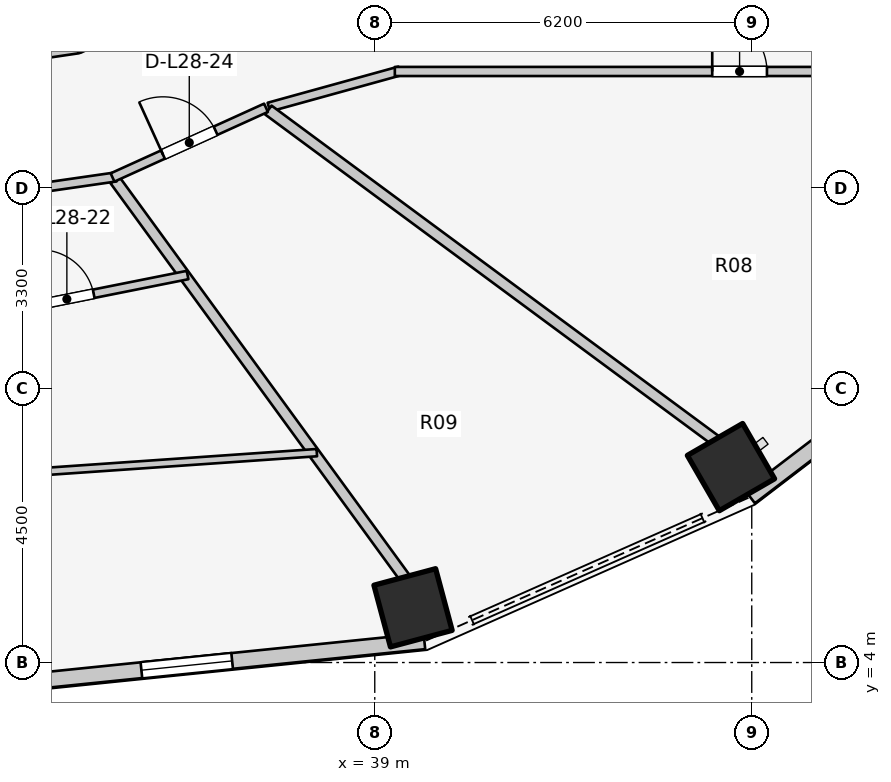
"""IFC4 building model, lengths in metres.
Left out: names, types, materials, properties, quantities, classifications, styles, units other than length and angle.
Written with IfcOpenShell. Run it as: python <this file> out.ifc"""

import sys

from ifc_helpers import new_model, si_unit, direction, frame, frame_2d, origin, origin_2d, place, context, subcontext, project, spatial, rectangle, extrude, element, fill, save


model = new_model("IFC4")
c1 = context("Model", 3, precision=1e-05, world=origin(), true_north=direction((0.0, 1.0)))
c2 = subcontext(c1, "Body", "Model", "MODEL_VIEW")
j1 = project(units=[si_unit("LENGTHUNIT", "METRE"), si_unit("PLANEANGLEUNIT", "RADIAN")], contexts=[c1])
p1 = place(None, origin())
s1 = spatial("IfcSite", under=j1, at=p1, CompositionType="ELEMENT")
p2 = place(p1, origin())
s2 = spatial("IfcBuilding", under=s1, at=p2, CompositionType="ELEMENT")
p3 = place(p2, frame((0.0, 0.0, 94.9)))
s3 = spatial("IfcBuildingStorey", under=s2, at=p3, CompositionType="ELEMENT", Elevation=94.9)
for number, where, z_axis, x_axis in (
    (1, (39.629, 4.9, 0.0), (0.0, 0.0, 1.0), (0.259, -0.966, 0.0)),
    (2, (44.858, 7.214, 0.0), (0.0, 0.0, 1.0), (0.5, -0.866, 0.0)),
):
    element("IfcColumn", number, at=place(p3, frame(where, z_axis=z_axis, x_axis=x_axis)), inside=s3, PredefinedType="COLUMN", context=c2, shape_type="SweptSolid", body=[
        extrude(rectangle(XDim=1.05, YDim=1.05, at=origin_2d()), origin(), (0.0, 0.0, 1.0), 3.1),
    ])
p4 = place(p3, frame((32.0, 3.551, 0.0), z_axis=(0.0, 0.0, 1.0), x_axis=(0.994821390558, 0.101638579726, 0.0)))
e3 = element("IfcWall", 3, at=p4, inside=s3, PredefinedType="STANDARD", context=c2, shape_type="SweptSolid", body=[
    extrude(rectangle(XDim=7.857, YDim=0.26, at=frame_2d((3.929, 0.0))), origin(), (0.0, 0.0, 1.0), 2.85),
])
p5 = place(p4, frame((3.178, 0.0, 0.75)))
e4 = element("IfcOpeningElement", 4, at=p5, cuts=e3, PredefinedType="OPENING", context=c2, shape_type="SweptSolid", body=[
    extrude(rectangle(XDim=1.5, YDim=1.6, at=frame_2d((0.75, 0.8))), frame((0.0, 0.14, 0.0), z_axis=(0.0, -1.0, 0.0), x_axis=(1.0, 0.0, 0.0)), (0.0, 0.0, 1.0), 0.28),
])
p6 = place(p3, frame((45.173, 6.722, 0.0), z_axis=(0.0, 0.0, 1.0), x_axis=(0.794809810864, 0.606858603427, 0.0)))
e5 = element("IfcWall", 5, at=p6, inside=s3, PredefinedType="STANDARD", context=c2, shape_type="SweptSolid", body=[
    extrude(rectangle(XDim=5.149, YDim=0.26, at=frame_2d((2.575, 0.0))), origin(), (0.0, 0.0, 1.0), 2.85),
])
p7 = place(p3, frame((32.0, 13.78, 0.0), z_axis=(0.0, 0.0, 1.0), x_axis=(0.989268584896, 0.146108408166, 0.0)))
e6 = element("IfcWall", 6, at=p7, inside=s3, PredefinedType="PARTITIONING", context=c2, shape_type="SweptSolid", body=[
    extrude(rectangle(XDim=2.151, YDim=0.15, at=frame_2d((1.075, 0.0))), origin(), (0.0, 0.0, 1.0), 2.272),
])
p8 = place(p3, frame((34.127, 14.094, 0.0), z_axis=(0.0, 0.0, 1.0), x_axis=(0.906943449489, 0.421252393975, 0.0)))
e7 = element("IfcWall", 7, at=p8, inside=s3, PredefinedType="PARTITIONING", context=c2, shape_type="SweptSolid", body=[
    extrude(rectangle(XDim=2.186, YDim=0.15, at=frame_2d((1.093, 0.0))), origin(), (0.0, 0.0, 1.0), 2.272),
])
p9 = place(p3, frame((37.258, 13.133, 0.0), z_axis=(0.0, 0.0, 1.0), x_axis=(0.963833843713, 0.266503886865, 0.0)))
e8 = element("IfcWall", 8, at=p9, inside=s3, PredefinedType="PARTITIONING", context=c2, shape_type="SweptSolid", body=[
    extrude(rectangle(XDim=2.232, YDim=0.15, at=frame_2d((1.116, 0.0))), origin(), (0.0, 0.0, 1.0), 2.272),
])
p10 = place(p3, frame((39.33, 13.72, 0.0), z_axis=(0.0, 0.0, 1.0), x_axis=(1.0, 0.0, 0.0)))
e9 = element("IfcWall", 9, at=p10, inside=s3, PredefinedType="PARTITIONING", context=c2, shape_type="SweptSolid", body=[
    extrude(rectangle(XDim=7.52, YDim=0.15, at=frame_2d((3.76, 0.0))), origin(), (0.0, 0.0, 1.0), 2.272),
])
p11 = place(p10, frame((5.22, 0.0, 0.0)))
e10 = element("IfcOpeningElement", 10, at=p11, cuts=e9, PredefinedType="OPENING", context=c2, shape_type="SweptSolid", body=[
    extrude(rectangle(XDim=0.9, YDim=2.1, at=frame_2d((0.45, 1.05))), frame((0.0, 0.085, 0.0), z_axis=(0.0, -1.0, 0.0), x_axis=(1.0, 0.0, 0.0)), (0.0, 0.0, 1.0), 0.17),
])
p12 = place(p3, frame((34.727, 11.934, 0.0), z_axis=(0.0, 0.0, 1.0), x_axis=(0.589042211476, -0.808102266486, 0.0)))
e11 = element("IfcWall", 11, at=p12, inside=s3, PredefinedType="PARTITIONING", context=c2, shape_type="SweptSolid", body=[
    extrude(rectangle(XDim=8.101, YDim=0.18, at=frame_2d((4.051, 0.0))), origin(), (0.0, 0.0, 1.0), 2.272),
])
p13 = place(p3, frame((37.249, 13.086, 0.0), z_axis=(0.0, 0.0, 1.0), x_axis=(0.80430981394, -0.594210167533, 0.0)))
e12 = element("IfcWall", 12, at=p13, inside=s3, PredefinedType="PARTITIONING", context=c2, shape_type="SweptSolid", body=[
    extrude(rectangle(XDim=9.146, YDim=0.18, at=frame_2d((4.573, 0.0))), origin(), (0.0, 0.0, 1.0), 2.272),
])
p14 = place(p3, frame((31.99, 7.032, 0.0), z_axis=(0.0, 0.0, 1.0), x_axis=(0.997605327057, 0.06916365684, 0.0)))
e13 = element("IfcWall", 13, at=p14, inside=s3, PredefinedType="MOVABLE", context=c2, shape_type="SweptSolid", body=[
    extrude(rectangle(XDim=6.072, YDim=0.12, at=frame_2d((3.036, 0.0))), origin(), (0.0, 0.0, 1.0), 2.272),
])
p15 = place(p3, frame((31.95, 11.583, 0.0), z_axis=(0.0, 0.0, 1.0), x_axis=(0.989761784218, 0.142729150844, 0.0)))
e14 = element("IfcWall", 14, at=p15, inside=s3, PredefinedType="PARTITIONING", context=c2, shape_type="SweptSolid", body=[
    extrude(rectangle(XDim=2.822, YDim=0.15, at=frame_2d((1.411, 0.0))), origin(), (0.0, 0.0, 1.0), 2.272),
])
p16 = place(p3, frame((31.951, 9.58, 0.0), z_axis=(0.0, 0.0, 1.0), x_axis=(0.980668708329, 0.195675457082, 0.0)))
e15 = element("IfcWall", 15, at=p16, inside=s3, PredefinedType="PLUMBINGWALL", context=c2, shape_type="SweptSolid", body=[
    extrude(rectangle(XDim=4.049, YDim=0.14, at=frame_2d((2.024, 0.0))), origin(), (0.0, 0.0, 1.0), 2.272),
])
p17 = place(p16, frame((1.574, 0.0, 0.0)))
e16 = element("IfcOpeningElement", 16, at=p17, cuts=e15, PredefinedType="OPENING", context=c2, shape_type="SweptSolid", body=[
    extrude(rectangle(XDim=0.9, YDim=2.1, at=frame_2d((0.45, 1.05))), frame((0.0, 0.08, 0.0), z_axis=(0.0, -1.0, 0.0), x_axis=(1.0, 0.0, 0.0)), (0.0, 0.0, 1.0), 0.16),
])
p18 = place(p3, frame((34.687, 11.977, 0.0), z_axis=(0.0, 0.0, 1.0), x_axis=(0.910568469686, 0.41335827319, 0.0)))
e17 = element("IfcWall", 17, at=p18, inside=s3, PredefinedType="PARTITIONING", context=c2, shape_type="SweptSolid", body=[
    extrude(rectangle(XDim=2.772, YDim=0.15, at=frame_2d((1.386, 0.0))), origin(), (0.0, 0.0, 1.0), 2.272),
])
p19 = place(p18, frame((0.911, 0.0, 0.0)))
e18 = element("IfcOpeningElement", 18, at=p19, cuts=e17, PredefinedType="OPENING", context=c2, shape_type="SweptSolid", body=[
    extrude(rectangle(XDim=0.95, YDim=2.1, at=frame_2d((0.475, 1.05))), frame((0.0, 0.085, 0.0), z_axis=(0.0, -1.0, 0.0), x_axis=(1.0, 0.0, 0.0)), (0.0, 0.0, 1.0), 0.17),
])
p20 = place(p5, origin())
e19 = element("IfcWindow", 19, at=p20, inside=s3, PartitioningType="SINGLE_PANEL", PredefinedType="WINDOW", context=c2, shape_type="SweptSolid", body=[
    extrude(rectangle(XDim=1.5, YDim=1.6, at=frame_2d((0.75, 0.8))), frame((0.0, 0.03, 0.0), z_axis=(0.0, -1.0, 0.0), x_axis=(1.0, 0.0, 0.0)), (0.0, 0.0, 1.0), 0.06),
])
fill(e4, e19)
p21 = place(p11, origin())
e20 = element("IfcDoor", 20, at=p21, inside=s3, OperationType="SINGLE_SWING_LEFT", PredefinedType="DOOR", context=c2, shape_type="SweptSolid", body=[
    extrude(rectangle(XDim=0.9, YDim=2.1, at=frame_2d((0.45, 1.05))), frame((0.0, 0.025, 0.0), z_axis=(0.0, -1.0, 0.0), x_axis=(1.0, 0.0, 0.0)), (0.0, 0.0, 1.0), 0.05),
])
fill(e10, e20)
p22 = place(p17, origin())
e21 = element("IfcDoor", 21, at=p22, inside=s3, OperationType="SINGLE_SWING_LEFT", PredefinedType="DOOR", context=c2, shape_type="SweptSolid", body=[
    extrude(rectangle(XDim=0.9, YDim=2.1, at=frame_2d((0.45, 1.05))), frame((0.0, 0.025, 0.0), z_axis=(0.0, -1.0, 0.0), x_axis=(1.0, 0.0, 0.0)), (0.0, 0.0, 1.0), 0.05),
])
fill(e16, e21)
p23 = place(p19, origin())
e22 = element("IfcDoor", 22, at=p23, inside=s3, OperationType="SINGLE_SWING_LEFT", PredefinedType="DOOR", context=c2, shape_type="SweptSolid", body=[
    extrude(rectangle(XDim=0.95, YDim=2.1, at=frame_2d((0.475, 1.05))), frame((0.0, 0.025, 0.0), z_axis=(0.0, -1.0, 0.0), x_axis=(1.0, 0.0, 0.0)), (0.0, 0.0, 1.0), 0.05),
])
fill(e18, e22)
save(model, sys.argv[1])
